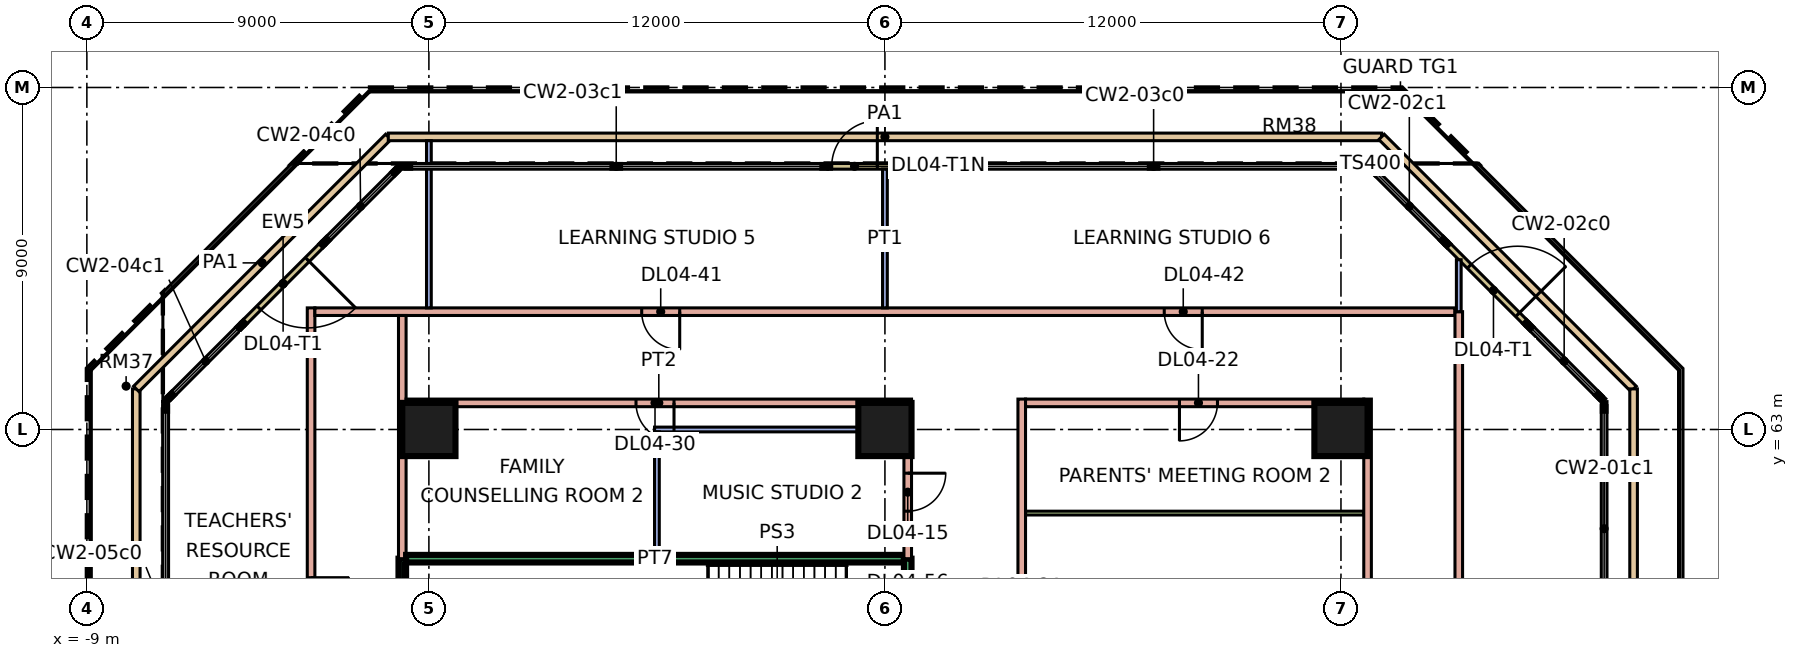
"""IFC4 building model, lengths in metres.
Left out: names, types, materials, properties, quantities, classifications, styles, units other than length and angle.
Written with IfcOpenShell. Run it as: python <this file> out.ifc"""

import sys

from ifc_helpers import new_model, si_unit, direction, frame, frame_2d, origin, origin_2d, place, context, subcontext, project, spatial, rectangle, extrude, element, fill, save


model = new_model("IFC4")
c1 = context("Model", 3, precision=1e-05, world=origin(), true_north=direction((0.0, 1.0)))
c2 = subcontext(c1, "Body", "Model", "MODEL_VIEW")
j1 = project(units=[si_unit("LENGTHUNIT", "METRE"), si_unit("PLANEANGLEUNIT", "RADIAN")], contexts=[c1])
p1 = place(None, origin())
s1 = spatial("IfcSite", under=j1, at=p1, CompositionType="ELEMENT")
p2 = place(p1, origin())
s2 = spatial("IfcBuilding", under=s1, at=p2, CompositionType="ELEMENT")
p3 = place(p2, frame((0.0, 0.0, 21.6)))
s3 = spatial("IfcBuildingStorey", under=s2, at=p3, CompositionType="ELEMENT", Elevation=21.6)
for number, where, z_axis, x_axis in (
    (1, (0.0, 63.0, 0.0), (0.0, 0.0, 1.0), (1.0, 0.0, 0.0)),
    (2, (12.0, 63.0, 0.0), (0.0, 0.0, 1.0), (1.0, 0.0, 0.0)),
    (3, (24.0, 63.0, 0.0), (0.0, 0.0, 1.0), (1.0, 0.0, 0.0)),
):
    element("IfcColumn", number, at=place(p3, frame(where, z_axis=z_axis, x_axis=x_axis)), inside=s3, PredefinedType="COLUMN", context=c2, shape_type="SweptSolid", body=[
        extrude(rectangle(XDim=1.4, YDim=1.4, at=origin_2d()), origin(), (0.0, 0.0, 1.0), 4.8),
    ])
p4 = place(p3, frame((28.897, 65.775, 0.0), z_axis=(0.0, 0.0, 1.0), x_axis=(-0.707106781187, 0.707106781187, 0.0)))
e4 = element("IfcWall", 4, at=p4, inside=s3, PredefinedType="SOLIDWALL", context=c2, shape_type="SweptSolid", body=[
    extrude(rectangle(XDim=3.0, YDim=0.15, at=frame_2d((1.5, 0.0))), origin(), (0.0, 0.0, 1.0), 4.4),
])
p5 = place(p4, frame((0.35, 0.0, 0.0)))
e5 = element("IfcOpeningElement", 5, at=p5, cuts=e4, PredefinedType="OPENING", context=c2, shape_type="SweptSolid", body=[
    extrude(rectangle(XDim=1.8, YDim=2.4, at=frame_2d((0.9, 1.2))), frame((0.0, 0.085, 0.0), z_axis=(0.0, -1.0, 0.0), x_axis=(1.0, 0.0, 0.0)), (0.0, 0.0, 1.0), 0.17),
])
p6 = place(p3, frame((13.5, 69.925, 0.0), z_axis=(0.0, 0.0, 1.0), x_axis=(-1.0, 0.0, 0.0)))
e6 = element("IfcWall", 6, at=p6, inside=s3, PredefinedType="SOLIDWALL", context=c2, shape_type="SweptSolid", body=[
    extrude(rectangle(XDim=3.0, YDim=0.15, at=frame_2d((1.5, 0.0))), origin(), (0.0, 0.0, 1.0), 4.4),
])
p7 = place(p6, frame((1.7, 0.0, 0.0)))
e7 = element("IfcOpeningElement", 7, at=p7, cuts=e6, PredefinedType="OPENING", context=c2, shape_type="SweptSolid", body=[
    extrude(rectangle(XDim=1.2, YDim=2.4, at=frame_2d((0.6, 1.2))), frame((0.0, 0.085, 0.0), z_axis=(0.0, -1.0, 0.0), x_axis=(1.0, 0.0, 0.0)), (0.0, 0.0, 1.0), 0.17),
])
p8 = place(p3, frame((-2.775, 67.897, 0.0), z_axis=(0.0, 0.0, 1.0), x_axis=(-0.707106781187, -0.707106781187, 0.0)))
e8 = element("IfcWall", 8, at=p8, inside=s3, PredefinedType="SOLIDWALL", context=c2, shape_type="SweptSolid", body=[
    extrude(rectangle(XDim=3.0, YDim=0.15, at=frame_2d((1.5, 0.0))), origin(), (0.0, 0.0, 1.0), 4.4),
])
p9 = place(p8, frame((0.6, 0.0, 0.0)))
e9 = element("IfcOpeningElement", 9, at=p9, cuts=e8, PredefinedType="OPENING", context=c2, shape_type="SweptSolid", body=[
    extrude(rectangle(XDim=1.8, YDim=2.4, at=frame_2d((0.9, 1.2))), frame((0.0, 0.085, 0.0), z_axis=(0.0, -1.0, 0.0), x_axis=(1.0, 0.0, 0.0)), (0.0, 0.0, 1.0), 0.17),
])
p10 = place(p3, frame((-7.7, 9.932, 0.0), z_axis=(0.0, 0.0, 1.0), x_axis=(0.0, 1.0, 0.0)))
e10 = element("IfcWall", 10, at=p10, inside=s3, PredefinedType="PARAPET", context=c2, shape_type="SweptSolid", body=[
    extrude(rectangle(XDim=54.136, YDim=0.2, at=frame_2d((27.068, 0.0))), origin(), (0.0, 0.0, 1.0), 0.5),
])
p11 = place(p3, frame((-7.7, 64.068, 0.0), z_axis=(0.0, 0.0, 1.0), x_axis=(0.707106781187, 0.707106781187, 0.0)))
e11 = element("IfcWall", 11, at=p11, inside=s3, PredefinedType="PARAPET", context=c2, shape_type="SweptSolid", body=[
    extrude(rectangle(XDim=9.379, YDim=0.2, at=frame_2d((4.689, 0.0))), origin(), (0.0, 0.0, 1.0), 0.5),
])
p12 = place(p3, frame((-1.068, 70.7, 0.0), z_axis=(0.0, 0.0, 1.0), x_axis=(1.0, 0.0, 0.0)))
e12 = element("IfcWall", 12, at=p12, inside=s3, PredefinedType="PARAPET", context=c2, shape_type="SweptSolid", body=[
    extrude(rectangle(XDim=26.136, YDim=0.2, at=frame_2d((13.068, 0.0))), origin(), (0.0, 0.0, 1.0), 0.5),
])
p13 = place(p3, frame((25.068, 70.7, 0.0), z_axis=(0.0, 0.0, 1.0), x_axis=(0.707106781187, -0.707106781187, 0.0)))
e13 = element("IfcWall", 13, at=p13, inside=s3, PredefinedType="PARAPET", context=c2, shape_type="SweptSolid", body=[
    extrude(rectangle(XDim=9.379, YDim=0.2, at=frame_2d((4.689, 0.0))), origin(), (0.0, 0.0, 1.0), 0.5),
])
p14 = place(p3, frame((31.7, 64.068, 0.0), z_axis=(0.0, 0.0, 1.0), x_axis=(0.0, -1.0, 0.0)))
e14 = element("IfcWall", 14, at=p14, inside=s3, PredefinedType="PARAPET", context=c2, shape_type="SweptSolid", body=[
    extrude(rectangle(XDim=15.868, YDim=0.2, at=frame_2d((7.934, 0.0))), origin(), (0.0, 0.0, 1.0), 0.5),
])
p15 = place(p3, frame((-3.1, 5.473, 0.0), z_axis=(0.0, 0.0, 1.0), x_axis=(0.0, 1.0, 0.0)))
e15 = element("IfcWall", 15, at=p15, inside=s3, PredefinedType="PARTITIONING", context=c2, shape_type="SweptSolid", body=[
    extrude(rectangle(XDim=60.727, YDim=0.2, at=frame_2d((30.363, 0.0))), origin(), (0.0, 0.0, 1.0), 4.4),
])
p16 = place(p15, frame((12.127, 0.0, 0.0)))
e16 = element("IfcOpeningElement", 16, at=p16, cuts=e15, PredefinedType="OPENING", context=c2, shape_type="SweptSolid", body=[
    extrude(rectangle(XDim=1.0, YDim=2.1, at=frame_2d((0.5, 1.05))), frame((0.0, 0.11, 0.0), z_axis=(0.0, -1.0, 0.0), x_axis=(1.0, 0.0, 0.0)), (0.0, 0.0, 1.0), 0.22),
])
p17 = place(p15, frame((24.127, 0.0, 0.0)))
e17 = element("IfcOpeningElement", 17, at=p17, cuts=e15, PredefinedType="OPENING", context=c2, shape_type="SweptSolid", body=[
    extrude(rectangle(XDim=1.0, YDim=2.1, at=frame_2d((0.5, 1.05))), frame((0.0, 0.11, 0.0), z_axis=(0.0, -1.0, 0.0), x_axis=(1.0, 0.0, 0.0)), (0.0, 0.0, 1.0), 0.22),
])
p18 = place(p15, frame((34.627, 0.0, 0.0)))
e18 = element("IfcOpeningElement", 18, at=p18, cuts=e15, PredefinedType="OPENING", context=c2, shape_type="SweptSolid", body=[
    extrude(rectangle(XDim=1.0, YDim=2.1, at=frame_2d((0.5, 1.05))), frame((0.0, 0.11, 0.0), z_axis=(0.0, -1.0, 0.0), x_axis=(1.0, 0.0, 0.0)), (0.0, 0.0, 1.0), 0.22),
])
p19 = place(p15, frame((43.627, 0.0, 0.0)))
e19 = element("IfcOpeningElement", 19, at=p19, cuts=e15, PredefinedType="OPENING", context=c2, shape_type="SweptSolid", body=[
    extrude(rectangle(XDim=1.0, YDim=2.1, at=frame_2d((0.5, 1.05))), frame((0.0, 0.11, 0.0), z_axis=(0.0, -1.0, 0.0), x_axis=(1.0, 0.0, 0.0)), (0.0, 0.0, 1.0), 0.22),
])
p20 = place(p15, frame((52.627, 0.0, 0.0)))
e20 = element("IfcOpeningElement", 20, at=p20, cuts=e15, PredefinedType="OPENING", context=c2, shape_type="SweptSolid", body=[
    extrude(rectangle(XDim=1.0, YDim=2.1, at=frame_2d((0.5, 1.05))), frame((0.0, 0.11, 0.0), z_axis=(0.0, -1.0, 0.0), x_axis=(1.0, 0.0, 0.0)), (0.0, 0.0, 1.0), 0.22),
])
p21 = place(p3, frame((-3.0, 66.1, 0.0), z_axis=(0.0, 0.0, 1.0), x_axis=(1.0, 0.0, 0.0)))
e21 = element("IfcWall", 21, at=p21, inside=s3, PredefinedType="PARTITIONING", context=c2, shape_type="SweptSolid", body=[
    extrude(rectangle(XDim=30.0, YDim=0.2, at=frame_2d((15.0, 0.0))), origin(), (0.0, 0.0, 1.0), 4.4),
])
p22 = place(p21, frame((8.6, 0.0, 0.0)))
e22 = element("IfcOpeningElement", 22, at=p22, cuts=e21, PredefinedType="OPENING", context=c2, shape_type="SweptSolid", body=[
    extrude(rectangle(XDim=1.0, YDim=2.1, at=frame_2d((0.5, 1.05))), frame((0.0, 0.11, 0.0), z_axis=(0.0, -1.0, 0.0), x_axis=(1.0, 0.0, 0.0)), (0.0, 0.0, 1.0), 0.22),
])
p23 = place(p21, frame((22.35, 0.0, 0.0)))
e23 = element("IfcOpeningElement", 23, at=p23, cuts=e21, PredefinedType="OPENING", context=c2, shape_type="SweptSolid", body=[
    extrude(rectangle(XDim=1.0, YDim=2.1, at=frame_2d((0.5, 1.05))), frame((0.0, 0.11, 0.0), z_axis=(0.0, -1.0, 0.0), x_axis=(1.0, 0.0, 0.0)), (0.0, 0.0, 1.0), 0.22),
])
p24 = place(p3, frame((-0.7, 54.0, 0.0), z_axis=(0.0, 0.0, 1.0), x_axis=(0.0, 1.0, 0.0)))
e24 = element("IfcWall", 24, at=p24, inside=s3, PredefinedType="SOLIDWALL", context=c2, shape_type="SweptSolid", body=[
    extrude(rectangle(XDim=5.6, YDim=0.2, at=frame_2d((2.8, 0.0))), origin(), (0.0, 0.0, 1.0), 4.4),
])
p25 = place(p3, frame((-0.7, 59.6, 0.0), z_axis=(0.0, 0.0, 1.0), x_axis=(0.0, 1.0, 0.0)))
e25 = element("IfcWall", 25, at=p25, inside=s3, PredefinedType="PARTITIONING", context=c2, shape_type="SweptSolid", body=[
    extrude(rectangle(XDim=6.4, YDim=0.2, at=frame_2d((3.2, 0.0))), origin(), (0.0, 0.0, 1.0), 4.4),
])
p26 = place(p3, frame((-0.6, 59.6, 0.0), z_axis=(0.0, 0.0, 1.0), x_axis=(1.0, 0.0, 0.0)))
e26 = element("IfcWall", 26, at=p26, inside=s3, PredefinedType="SOLIDWALL", context=c2, shape_type="SweptSolid", body=[
    extrude(rectangle(XDim=13.1, YDim=0.2, at=frame_2d((6.55, 0.0))), origin(), (0.0, 0.0, 1.0), 4.4),
])
p27 = place(p3, frame((-0.6, 63.7, 0.0), z_axis=(0.0, 0.0, 1.0), x_axis=(1.0, 0.0, 0.0)))
e27 = element("IfcWall", 27, at=p27, inside=s3, PredefinedType="PARTITIONING", context=c2, shape_type="SweptSolid", body=[
    extrude(rectangle(XDim=13.3, YDim=0.2, at=frame_2d((6.65, 0.0))), origin(), (0.0, 0.0, 1.0), 4.4),
])
p28 = place(p27, frame((6.05, 0.0, 0.0)))
e28 = element("IfcOpeningElement", 28, at=p28, cuts=e27, PredefinedType="OPENING", context=c2, shape_type="SweptSolid", body=[
    extrude(rectangle(XDim=1.0, YDim=2.1, at=frame_2d((0.5, 1.05))), frame((0.0, 0.11, 0.0), z_axis=(0.0, -1.0, 0.0), x_axis=(1.0, 0.0, 0.0)), (0.0, 0.0, 1.0), 0.22),
])
p29 = place(p3, frame((0.0, 66.2, 0.0), z_axis=(0.0, 0.0, 1.0), x_axis=(0.0, 1.0, 0.0)))
e29 = element("IfcWall", 29, at=p29, inside=s3, PredefinedType="PARTITIONING", context=c2, shape_type="SweptSolid", body=[
    extrude(rectangle(XDim=4.4, YDim=0.125, at=frame_2d((2.2, 0.0))), origin(), (0.0, 0.0, 1.0), 4.4),
])
p30 = place(p3, frame((5.938, 63.0, 0.0), z_axis=(0.0, 0.0, 1.0), x_axis=(1.0, 0.0, 0.0)))
e30 = element("IfcWall", 30, at=p30, inside=s3, PredefinedType="PARTITIONING", context=c2, shape_type="SweptSolid", body=[
    extrude(rectangle(XDim=6.562, YDim=0.125, at=frame_2d((3.281, 0.0))), origin(), (0.0, 0.0, 1.0), 4.4),
])
p31 = place(p3, frame((6.0, 59.7, 0.0), z_axis=(0.0, 0.0, 1.0), x_axis=(0.0, 1.0, 0.0)))
e31 = element("IfcWall", 31, at=p31, inside=s3, PredefinedType="PARTITIONING", context=c2, shape_type="SweptSolid", body=[
    extrude(rectangle(XDim=3.238, YDim=0.125, at=frame_2d((1.619, 0.0))), origin(), (0.0, 0.0, 1.0), 4.4),
])
p32 = place(p3, frame((12.0, 66.2, 0.0), z_axis=(0.0, 0.0, 1.0), x_axis=(0.0, 1.0, 0.0)))
e32 = element("IfcWall", 32, at=p32, inside=s3, PredefinedType="PARTITIONING", context=c2, shape_type="SweptSolid", body=[
    extrude(rectangle(XDim=3.651, YDim=0.125, at=frame_2d((1.826, 0.0))), origin(), (0.0, 0.0, 1.0), 4.4),
])
p33 = place(p3, frame((12.6, 54.0, 0.0), z_axis=(0.0, 0.0, 1.0), x_axis=(0.0, 1.0, 0.0)))
e33 = element("IfcWall", 33, at=p33, inside=s3, PredefinedType="SOLIDWALL", context=c2, shape_type="SweptSolid", body=[
    extrude(rectangle(XDim=5.6, YDim=0.2, at=frame_2d((2.8, 0.0))), origin(), (0.0, 0.0, 1.0), 4.4),
])
p34 = place(p33, frame((3.25, 0.0, 0.0)))
e34 = element("IfcOpeningElement", 34, at=p34, cuts=e33, PredefinedType="OPENING", context=c2, shape_type="SweptSolid", body=[
    extrude(rectangle(XDim=1.2, YDim=2.1, at=frame_2d((0.6, 1.05))), frame((0.0, 0.11, 0.0), z_axis=(0.0, -1.0, 0.0), x_axis=(1.0, 0.0, 0.0)), (0.0, 0.0, 1.0), 0.22),
])
p35 = place(p3, frame((12.6, 59.6, 0.0), z_axis=(0.0, 0.0, 1.0), x_axis=(0.0, 1.0, 0.0)))
e35 = element("IfcWall", 35, at=p35, inside=s3, PredefinedType="PARTITIONING", context=c2, shape_type="SweptSolid", body=[
    extrude(rectangle(XDim=4.0, YDim=0.2, at=frame_2d((2.0, 0.0))), origin(), (0.0, 0.0, 1.0), 4.4),
])
p36 = place(p35, frame((1.25, 0.0, 0.0)))
e36 = element("IfcOpeningElement", 36, at=p36, cuts=e35, PredefinedType="OPENING", context=c2, shape_type="SweptSolid", body=[
    extrude(rectangle(XDim=1.0, YDim=2.1, at=frame_2d((0.5, 1.05))), frame((0.0, 0.11, 0.0), z_axis=(0.0, -1.0, 0.0), x_axis=(1.0, 0.0, 0.0)), (0.0, 0.0, 1.0), 0.22),
])
p37 = place(p3, frame((15.6, 51.225, 0.0), z_axis=(0.0, 0.0, 1.0), x_axis=(0.0, 1.0, 0.0)))
e37 = element("IfcWall", 37, at=p37, inside=s3, PredefinedType="PARTITIONING", context=c2, shape_type="SweptSolid", body=[
    extrude(rectangle(XDim=12.575, YDim=0.2, at=frame_2d((6.288, 0.0))), origin(), (0.0, 0.0, 1.0), 4.4),
])
p38 = place(p37, frame((6.025, 0.0, 0.0)))
e38 = element("IfcOpeningElement", 38, at=p38, cuts=e37, PredefinedType="OPENING", context=c2, shape_type="SweptSolid", body=[
    extrude(rectangle(XDim=1.0, YDim=2.1, at=frame_2d((0.5, 1.05))), frame((0.0, 0.11, 0.0), z_axis=(0.0, -1.0, 0.0), x_axis=(1.0, 0.0, 0.0)), (0.0, 0.0, 1.0), 0.22),
])
p39 = place(p3, frame((15.7, 60.8, 0.0), z_axis=(0.0, 0.0, 1.0), x_axis=(1.0, 0.0, 0.0)))
e39 = element("IfcWall", 39, at=p39, inside=s3, PredefinedType="PARTITIONING", context=c2, shape_type="SweptSolid", body=[
    extrude(rectangle(XDim=8.9, YDim=0.1, at=frame_2d((4.45, 0.0))), origin(), (0.0, 0.0, 1.0), 4.4),
])
p40 = place(p3, frame((15.7, 63.7, 0.0), z_axis=(0.0, 0.0, 1.0), x_axis=(1.0, 0.0, 0.0)))
e40 = element("IfcWall", 40, at=p40, inside=s3, PredefinedType="PARTITIONING", context=c2, shape_type="SweptSolid", body=[
    extrude(rectangle(XDim=8.9, YDim=0.2, at=frame_2d((4.45, 0.0))), origin(), (0.0, 0.0, 1.0), 4.4),
])
p41 = place(p40, frame((4.05, 0.0, 0.0)))
e41 = element("IfcOpeningElement", 41, at=p41, cuts=e40, PredefinedType="OPENING", context=c2, shape_type="SweptSolid", body=[
    extrude(rectangle(XDim=1.0, YDim=2.1, at=frame_2d((0.5, 1.05))), frame((0.0, 0.11, 0.0), z_axis=(0.0, -1.0, 0.0), x_axis=(1.0, 0.0, 0.0)), (0.0, 0.0, 1.0), 0.22),
])
p42 = place(p3, frame((24.7, 44.3, 0.0), z_axis=(0.0, 0.0, 1.0), x_axis=(0.0, 1.0, 0.0)))
e42 = element("IfcWall", 42, at=p42, inside=s3, PredefinedType="PARTITIONING", context=c2, shape_type="SweptSolid", body=[
    extrude(rectangle(XDim=19.5, YDim=0.2, at=frame_2d((9.75, 0.0))), origin(), (0.0, 0.0, 1.0), 4.4),
])
p43 = place(p42, frame((1.45, 0.0, 0.0)))
e43 = element("IfcOpeningElement", 43, at=p43, cuts=e42, PredefinedType="OPENING", context=c2, shape_type="SweptSolid", body=[
    extrude(rectangle(XDim=1.0, YDim=2.1, at=frame_2d((0.5, 1.05))), frame((0.0, 0.11, 0.0), z_axis=(0.0, -1.0, 0.0), x_axis=(1.0, 0.0, 0.0)), (0.0, 0.0, 1.0), 0.22),
])
p44 = place(p42, frame((6.65, 0.0, 0.0)))
e44 = element("IfcOpeningElement", 44, at=p44, cuts=e42, PredefinedType="OPENING", context=c2, shape_type="SweptSolid", body=[
    extrude(rectangle(XDim=1.0, YDim=2.1, at=frame_2d((0.5, 1.05))), frame((0.0, 0.11, 0.0), z_axis=(0.0, -1.0, 0.0), x_axis=(1.0, 0.0, 0.0)), (0.0, 0.0, 1.0), 0.22),
])
p45 = place(p3, frame((27.1, 38.3, 0.0), z_axis=(0.0, 0.0, 1.0), x_axis=(0.0, 1.0, 0.0)))
e45 = element("IfcWall", 45, at=p45, inside=s3, PredefinedType="PARTITIONING", context=c2, shape_type="SweptSolid", body=[
    extrude(rectangle(XDim=27.8, YDim=0.2, at=frame_2d((13.9, 0.0))), origin(), (0.0, 0.0, 1.0), 4.4),
])
p46 = place(p45, frame((13.25, 0.0, 0.0)))
e46 = element("IfcOpeningElement", 46, at=p46, cuts=e45, PredefinedType="OPENING", context=c2, shape_type="SweptSolid", body=[
    extrude(rectangle(XDim=1.8, YDim=2.1, at=frame_2d((0.9, 1.05))), frame((0.0, 0.11, 0.0), z_axis=(0.0, -1.0, 0.0), x_axis=(1.0, 0.0, 0.0)), (0.0, 0.0, 1.0), 0.22),
])
p47 = place(p45, frame((3.25, 0.0, 0.0)))
e47 = element("IfcOpeningElement", 47, at=p47, cuts=e45, PredefinedType="OPENING", context=c2, shape_type="SweptSolid", body=[
    extrude(rectangle(XDim=1.8, YDim=2.1, at=frame_2d((0.9, 1.05))), frame((0.0, 0.11, 0.0), z_axis=(0.0, -1.0, 0.0), x_axis=(1.0, 0.0, 0.0)), (0.0, 0.0, 1.0), 0.22),
])
p48 = place(p3, frame((27.1, 66.1, 0.0), z_axis=(0.0, 0.0, 1.0), x_axis=(0.0, 1.0, 0.0)))
e48 = element("IfcWall", 48, at=p48, inside=s3, PredefinedType="PARTITIONING", context=c2, shape_type="SweptSolid", body=[
    extrude(rectangle(XDim=1.367, YDim=0.125, at=frame_2d((0.684, 0.0))), origin(), (0.0, 0.0, 1.0), 4.4),
])
p49 = place(p5, frame((1.8, 0.0, 0.0), z_axis=(0.0, 0.0, 1.0), x_axis=(-1.0, 0.0, 0.0)))
e49 = element("IfcDoor", 49, at=p49, inside=s3, OperationType="DOUBLE_DOOR_SINGLE_SWING", PredefinedType="DOOR", context=c2, shape_type="SweptSolid", body=[
    extrude(rectangle(XDim=1.8, YDim=2.4, at=frame_2d((0.9, 1.2))), frame((0.0, 0.025, 0.0), z_axis=(0.0, -1.0, 0.0), x_axis=(1.0, 0.0, 0.0)), (0.0, 0.0, 1.0), 0.05),
])
fill(e5, e49)
p50 = place(p7, frame((1.2, 0.0, 0.0), z_axis=(0.0, 0.0, 1.0), x_axis=(-1.0, 0.0, 0.0)))
e50 = element("IfcDoor", 50, at=p50, inside=s3, OperationType="DOUBLE_DOOR_SINGLE_SWING", PredefinedType="DOOR", context=c2, shape_type="SweptSolid", body=[
    extrude(rectangle(XDim=1.2, YDim=2.4, at=frame_2d((0.6, 1.2))), frame((0.0, 0.025, 0.0), z_axis=(0.0, -1.0, 0.0), x_axis=(1.0, 0.0, 0.0)), (0.0, 0.0, 1.0), 0.05),
])
fill(e7, e50)
p51 = place(p9, origin())
e51 = element("IfcDoor", 51, at=p51, inside=s3, OperationType="DOUBLE_DOOR_SINGLE_SWING", PredefinedType="DOOR", context=c2, shape_type="SweptSolid", body=[
    extrude(rectangle(XDim=1.8, YDim=2.4, at=frame_2d((0.9, 1.2))), frame((0.0, 0.025, 0.0), z_axis=(0.0, -1.0, 0.0), x_axis=(1.0, 0.0, 0.0)), (0.0, 0.0, 1.0), 0.05),
])
fill(e9, e51)
p52 = place(p36, origin())
e52 = element("IfcDoor", 52, at=p52, inside=s3, OperationType="SINGLE_SWING_RIGHT", PredefinedType="DOOR", context=c2, shape_type="SweptSolid", body=[
    extrude(rectangle(XDim=1.0, YDim=2.1, at=frame_2d((0.5, 1.05))), frame((0.0, 0.025, 0.0), z_axis=(0.0, -1.0, 0.0), x_axis=(1.0, 0.0, 0.0)), (0.0, 0.0, 1.0), 0.05),
])
fill(e36, e52)
p53 = place(p41, frame((1.0, 0.0, 0.0), z_axis=(0.0, 0.0, 1.0), x_axis=(-1.0, 0.0, 0.0)))
e53 = element("IfcDoor", 53, at=p53, inside=s3, OperationType="SINGLE_SWING_LEFT", PredefinedType="DOOR", context=c2, shape_type="SweptSolid", body=[
    extrude(rectangle(XDim=1.0, YDim=2.1, at=frame_2d((0.5, 1.05))), frame((0.0, 0.025, 0.0), z_axis=(0.0, -1.0, 0.0), x_axis=(1.0, 0.0, 0.0)), (0.0, 0.0, 1.0), 0.05),
])
fill(e41, e53)
p54 = place(p28, origin())
e54 = element("IfcDoor", 54, at=p54, inside=s3, OperationType="SINGLE_SWING_RIGHT", PredefinedType="DOOR", context=c2, shape_type="SweptSolid", body=[
    extrude(rectangle(XDim=1.0, YDim=2.1, at=frame_2d((0.5, 1.05))), frame((0.0, 0.025, 0.0), z_axis=(0.0, -1.0, 0.0), x_axis=(1.0, 0.0, 0.0)), (0.0, 0.0, 1.0), 0.05),
])
fill(e28, e54)
p55 = place(p22, origin())
e55 = element("IfcDoor", 55, at=p55, inside=s3, OperationType="SINGLE_SWING_RIGHT", PredefinedType="DOOR", context=c2, shape_type="SweptSolid", body=[
    extrude(rectangle(XDim=1.0, YDim=2.1, at=frame_2d((0.5, 1.05))), frame((0.0, 0.025, 0.0), z_axis=(0.0, -1.0, 0.0), x_axis=(1.0, 0.0, 0.0)), (0.0, 0.0, 1.0), 0.05),
])
fill(e22, e55)
p56 = place(p23, origin())
e56 = element("IfcDoor", 56, at=p56, inside=s3, OperationType="SINGLE_SWING_RIGHT", PredefinedType="DOOR", context=c2, shape_type="SweptSolid", body=[
    extrude(rectangle(XDim=1.0, YDim=2.1, at=frame_2d((0.5, 1.05))), frame((0.0, 0.025, 0.0), z_axis=(0.0, -1.0, 0.0), x_axis=(1.0, 0.0, 0.0)), (0.0, 0.0, 1.0), 0.05),
])
fill(e23, e56)
p57 = place(p20, origin())
e57 = element("IfcDoor", 57, at=p57, inside=s3, OperationType="SINGLE_SWING_RIGHT", PredefinedType="DOOR", context=c2, shape_type="SweptSolid", body=[
    extrude(rectangle(XDim=1.0, YDim=2.1, at=frame_2d((0.5, 1.05))), frame((0.0, 0.025, 0.0), z_axis=(0.0, -1.0, 0.0), x_axis=(1.0, 0.0, 0.0)), (0.0, 0.0, 1.0), 0.05),
])
fill(e20, e57)
save(model, sys.argv[1])
